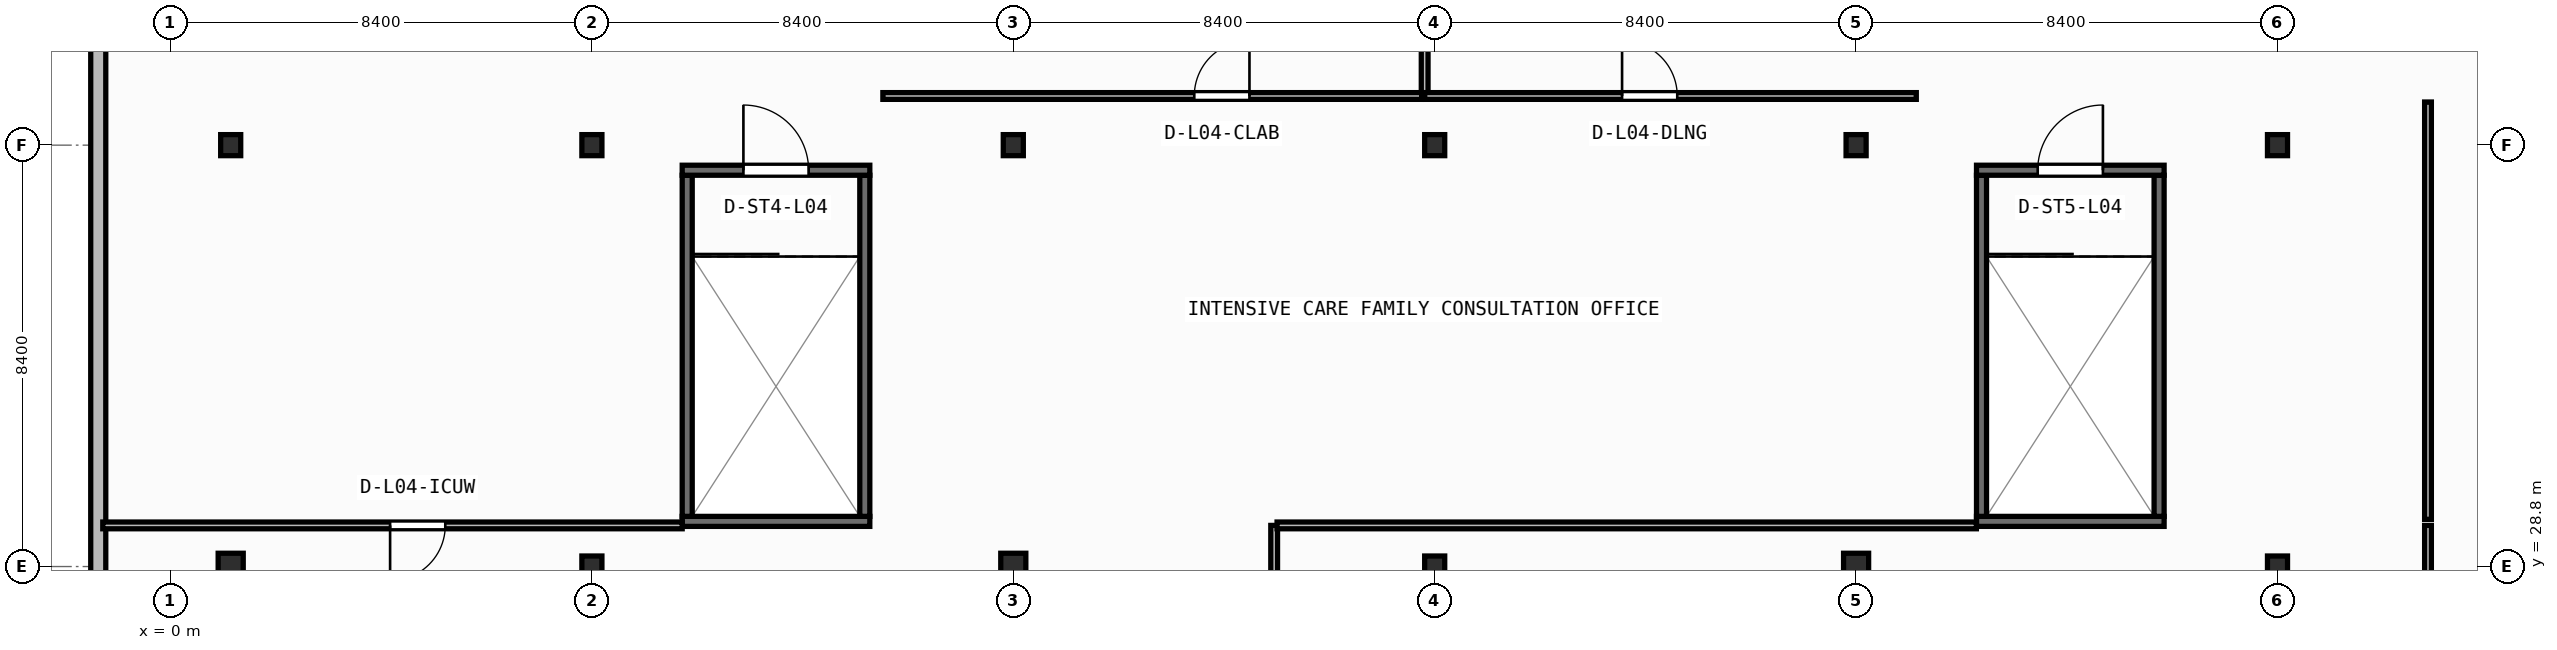
"""IFC4 building model, lengths in metres.
Left out: names, types, materials, properties, quantities, classifications, styles, units other than length and angle.
Written with IfcOpenShell. Run it as: python <this file> out.ifc"""

import sys

from ifc_helpers import new_model, si_unit, direction, frame, frame_2d, origin, origin_2d, place, context, subcontext, project, spatial, rectangle, i_section, extrude, element, fill, save


model = new_model("IFC4")
c1 = context("Model", 3, precision=1e-05, world=origin(), true_north=direction((0.0, 1.0)))
c2 = subcontext(c1, "Body", "Model", "MODEL_VIEW")
j1 = project(units=[si_unit("LENGTHUNIT", "METRE"), si_unit("PLANEANGLEUNIT", "RADIAN")], contexts=[c1])
p1 = place(None, origin())
s1 = spatial("IfcSite", under=j1, at=p1, CompositionType="ELEMENT")
p2 = place(p1, origin())
s2 = spatial("IfcBuilding", under=s1, at=p2, CompositionType="ELEMENT")
p3 = place(p2, frame((0.0, 0.0, 18.0)))
s3 = spatial("IfcBuildingStorey", under=s2, at=p3, CompositionType="ELEMENT", Elevation=18.0)
p4 = place(p3, frame((1.2, 28.8, 0.0), z_axis=(0.0, 0.0, 1.0), x_axis=(1.0, 0.0, 0.0)))
e1 = element("IfcColumn", 1, at=p4, inside=s3, PredefinedType="COLUMN", context=c2, shape_type="SweptSolid", body=[
    extrude(i_section(OverallWidth=0.5, OverallDepth=0.53, WebThickness=0.028, FlangeThickness=0.045, at=origin_2d()), origin(), (0.0, 0.0, 1.0), 4.5),
])
p5 = place(p3, frame((8.4, 28.8, 0.0), z_axis=(0.0, 0.0, 1.0), x_axis=(1.0, 0.0, 0.0)))
e2 = element("IfcColumn", 2, at=p5, inside=s3, PredefinedType="COLUMN", context=c2, shape_type="SweptSolid", body=[
    extrude(i_section(OverallWidth=0.4, OverallDepth=0.42, WebThickness=0.025, FlangeThickness=0.04, at=origin_2d()), origin(), (0.0, 0.0, 1.0), 4.5),
])
p6 = place(p3, frame((16.8, 28.8, 0.0), z_axis=(0.0, 0.0, 1.0), x_axis=(1.0, 0.0, 0.0)))
e3 = element("IfcColumn", 3, at=p6, inside=s3, PredefinedType="COLUMN", context=c2, shape_type="SweptSolid", body=[
    extrude(i_section(OverallWidth=0.5, OverallDepth=0.53, WebThickness=0.028, FlangeThickness=0.045, at=origin_2d()), origin(), (0.0, 0.0, 1.0), 4.5),
])
p7 = place(p3, frame((25.2, 28.8, 0.0), z_axis=(0.0, 0.0, 1.0), x_axis=(1.0, 0.0, 0.0)))
e4 = element("IfcColumn", 4, at=p7, inside=s3, PredefinedType="COLUMN", context=c2, shape_type="SweptSolid", body=[
    extrude(i_section(OverallWidth=0.4, OverallDepth=0.42, WebThickness=0.025, FlangeThickness=0.04, at=origin_2d()), origin(), (0.0, 0.0, 1.0), 4.5),
])
p8 = place(p3, frame((33.6, 28.8, 0.0), z_axis=(0.0, 0.0, 1.0), x_axis=(1.0, 0.0, 0.0)))
e5 = element("IfcColumn", 5, at=p8, inside=s3, PredefinedType="COLUMN", context=c2, shape_type="SweptSolid", body=[
    extrude(i_section(OverallWidth=0.5, OverallDepth=0.53, WebThickness=0.028, FlangeThickness=0.045, at=origin_2d()), origin(), (0.0, 0.0, 1.0), 4.5),
])
for number, where, z_axis, x_axis in (
    (6, (42.0, 28.8, 0.0), (0.0, 0.0, 1.0), (1.0, 0.0, 0.0)),
    (7, (1.2, 37.2, 0.0), (0.0, 0.0, 1.0), (1.0, 0.0, 0.0)),
    (8, (8.4, 37.2, 0.0), (0.0, 0.0, 1.0), (1.0, 0.0, 0.0)),
    (9, (16.8, 37.2, 0.0), (0.0, 0.0, 1.0), (1.0, 0.0, 0.0)),
    (10, (25.2, 37.2, 0.0), (0.0, 0.0, 1.0), (1.0, 0.0, 0.0)),
    (11, (33.6, 37.2, 0.0), (0.0, 0.0, 1.0), (1.0, 0.0, 0.0)),
    (12, (42.0, 37.2, 0.0), (0.0, 0.0, 1.0), (1.0, 0.0, 0.0)),
):
    element("IfcColumn", number, at=place(p3, frame(where, z_axis=z_axis, x_axis=x_axis)), inside=s3, PredefinedType="COLUMN", context=c2, shape_type="SweptSolid", body=[
        extrude(i_section(OverallWidth=0.4, OverallDepth=0.42, WebThickness=0.025, FlangeThickness=0.04, at=origin_2d()), origin(), (0.0, 0.0, 1.0), 4.5),
    ])
p9 = place(p3, frame((-1.44, 45.24, 0.0), z_axis=(0.0, 0.0, 1.0), x_axis=(0.0, -1.0, 0.0)))
e13 = element("IfcWall", 13, at=p9, inside=s3, PredefinedType="STANDARD", context=c2, shape_type="SweptSolid", body=[
    extrude(rectangle(XDim=44.48, YDim=0.3, at=frame_2d((22.24, 0.0))), origin(), (0.0, 0.0, 1.0), 4.08),
])
p10 = place(p9, frame((20.84, 0.0, 0.85)))
e14 = element("IfcOpeningElement", 14, at=p10, cuts=e13, PredefinedType="OPENING", context=c2, shape_type="SweptSolid", body=[
    extrude(rectangle(XDim=2.8, YDim=2.1, at=frame_2d((1.4, 1.05))), frame((0.0, 0.16, 0.0), z_axis=(0.0, -1.0, 0.0), x_axis=(1.0, 0.0, 0.0)), (0.0, 0.0, 1.0), 0.32),
])
p11 = place(p3, frame((10.2, 29.7, 0.0), z_axis=(0.0, 0.0, 1.0), x_axis=(1.0, 0.0, 0.0)))
e15 = element("IfcWall", 15, at=p11, inside=s3, PredefinedType="SHEAR", context=c2, shape_type="SweptSolid", body=[
    extrude(rectangle(XDim=3.74, YDim=0.2, at=frame_2d((1.87, 0.0))), origin(), (0.0, 0.0, 1.0), 4.08),
])
for number, where, z_axis, x_axis in (
    (16, (10.3, 29.8, 0.0), (0.0, 0.0, 1.0), (0.0, 1.0, 0.0)),
    (17, (13.84, 29.8, 0.0), (0.0, 0.0, 1.0), (0.0, 1.0, 0.0)),
):
    element("IfcWall", number, at=place(p3, frame(where, z_axis=z_axis, x_axis=x_axis)), inside=s3, PredefinedType="SHEAR", context=c2, shape_type="SweptSolid", body=[
        extrude(rectangle(XDim=6.8, YDim=0.2, at=frame_2d((3.4, 0.0))), origin(), (0.0, 0.0, 1.0), 4.08),
    ])
p12 = place(p3, frame((10.2, 36.7, 0.0), z_axis=(0.0, 0.0, 1.0), x_axis=(1.0, 0.0, 0.0)))
e18 = element("IfcWall", 18, at=p12, inside=s3, PredefinedType="SHEAR", context=c2, shape_type="SweptSolid", body=[
    extrude(rectangle(XDim=3.74, YDim=0.2, at=frame_2d((1.87, 0.0))), origin(), (0.0, 0.0, 1.0), 4.08),
])
p13 = place(p12, frame((1.22, 0.0, 0.0)))
e19 = element("IfcOpeningElement", 19, at=p13, cuts=e18, PredefinedType="OPENING", context=c2, shape_type="SweptSolid", body=[
    extrude(rectangle(XDim=1.3, YDim=2.15, at=frame_2d((0.65, 1.075))), frame((0.0, 0.11, 0.0), z_axis=(0.0, -1.0, 0.0), x_axis=(1.0, 0.0, 0.0)), (0.0, 0.0, 1.0), 0.22),
])
p14 = place(p3, frame((36.0, 29.7, 0.0), z_axis=(0.0, 0.0, 1.0), x_axis=(1.0, 0.0, 0.0)))
e20 = element("IfcWall", 20, at=p14, inside=s3, PredefinedType="SHEAR", context=c2, shape_type="SweptSolid", body=[
    extrude(rectangle(XDim=3.74, YDim=0.2, at=frame_2d((1.87, 0.0))), origin(), (0.0, 0.0, 1.0), 4.08),
])
for number, where, z_axis, x_axis in (
    (21, (36.1, 29.8, 0.0), (0.0, 0.0, 1.0), (0.0, 1.0, 0.0)),
    (22, (39.64, 29.8, 0.0), (0.0, 0.0, 1.0), (0.0, 1.0, 0.0)),
):
    element("IfcWall", number, at=place(p3, frame(where, z_axis=z_axis, x_axis=x_axis)), inside=s3, PredefinedType="SHEAR", context=c2, shape_type="SweptSolid", body=[
        extrude(rectangle(XDim=6.8, YDim=0.2, at=frame_2d((3.4, 0.0))), origin(), (0.0, 0.0, 1.0), 4.08),
    ])
p15 = place(p3, frame((36.0, 36.7, 0.0), z_axis=(0.0, 0.0, 1.0), x_axis=(1.0, 0.0, 0.0)))
e23 = element("IfcWall", 23, at=p15, inside=s3, PredefinedType="SHEAR", context=c2, shape_type="SweptSolid", body=[
    extrude(rectangle(XDim=3.74, YDim=0.2, at=frame_2d((1.87, 0.0))), origin(), (0.0, 0.0, 1.0), 4.08),
])
p16 = place(p15, frame((1.22, 0.0, 0.0)))
e24 = element("IfcOpeningElement", 24, at=p16, cuts=e23, PredefinedType="OPENING", context=c2, shape_type="SweptSolid", body=[
    extrude(rectangle(XDim=1.3, YDim=2.15, at=frame_2d((0.65, 1.075))), frame((0.0, 0.11, 0.0), z_axis=(0.0, -1.0, 0.0), x_axis=(1.0, 0.0, 0.0)), (0.0, 0.0, 1.0), 0.22),
])
p17 = place(p3, frame((22.0, 14.865, 0.0), z_axis=(0.0, 0.0, 1.0), x_axis=(0.0, 1.0, 0.0)))
e25 = element("IfcWall", 25, at=p17, inside=s3, PredefinedType="PARTITIONING", context=c2, shape_type="SweptSolid", body=[
    extrude(rectangle(XDim=14.755, YDim=0.135, at=frame_2d((7.377, 0.0))), origin(), (0.0, 0.0, 1.0), 4.08),
])
p18 = place(p3, frame((10.2, 29.62, 0.0), z_axis=(0.0, 0.0, 1.0), x_axis=(-1.0, 0.0, 0.0)))
e26 = element("IfcWall", 26, at=p18, inside=s3, PredefinedType="PARTITIONING", context=c2, shape_type="SweptSolid", body=[
    extrude(rectangle(XDim=11.55, YDim=0.135, at=frame_2d((5.775, 0.0))), origin(), (0.0, 0.0, 1.0), 4.08),
])
p19 = place(p18, frame((4.722, 0.0, 0.0)))
e27 = element("IfcOpeningElement", 27, at=p19, cuts=e26, PredefinedType="OPENING", context=c2, shape_type="SweptSolid", body=[
    extrude(rectangle(XDim=1.1, YDim=2.1, at=frame_2d((0.55, 1.05))), frame((0.0, 0.077, 0.0), z_axis=(0.0, -1.0, 0.0), x_axis=(1.0, 0.0, 0.0)), (0.0, 0.0, 1.0), 0.155),
])
p20 = place(p3, frame((35.998, 29.62, 0.0), z_axis=(0.0, 0.0, 1.0), x_axis=(-1.0, 0.0, 0.0)))
e28 = element("IfcWall", 28, at=p20, inside=s3, PredefinedType="PARTITIONING", context=c2, shape_type="SweptSolid", body=[
    extrude(rectangle(XDim=13.94, YDim=0.135, at=frame_2d((6.97, 0.0))), origin(), (0.0, 0.0, 1.0), 4.08),
])
p21 = place(p3, frame((45.0, 14.865, 0.0), z_axis=(0.0, 0.0, 1.0), x_axis=(0.0, 1.0, 0.0)))
e29 = element("IfcWall", 29, at=p21, inside=s3, PredefinedType="PARTITIONING", context=c2, shape_type="SweptSolid", body=[
    extrude(rectangle(XDim=14.755, YDim=0.135, at=frame_2d((7.377, 0.0))), origin(), (0.0, 0.0, 1.0), 4.08),
])
p22 = place(p3, frame((25.0, 42.64, 0.0), z_axis=(0.0, 0.0, 1.0), x_axis=(0.0, -1.0, 0.0)))
e30 = element("IfcWall", 30, at=p22, inside=s3, PredefinedType="PARTITIONING", context=c2, shape_type="SweptSolid", body=[
    extrude(rectangle(XDim=4.46, YDim=0.135, at=frame_2d((2.23, 0.0))), origin(), (0.0, 0.0, 1.0), 4.08),
])
p23 = place(p3, frame((25.0, 38.18, 0.0), z_axis=(0.0, 0.0, 1.0), x_axis=(1.0, 0.0, 0.0)))
e31 = element("IfcWall", 31, at=p23, inside=s3, PredefinedType="PARTITIONING", context=c2, shape_type="SweptSolid", body=[
    extrude(rectangle(XDim=9.8, YDim=0.135, at=frame_2d((4.9, 0.0))), origin(), (0.0, 0.0, 1.0), 4.08),
])
p24 = place(p23, frame((3.935, 0.0, 0.0)))
e32 = element("IfcOpeningElement", 32, at=p24, cuts=e31, PredefinedType="OPENING", context=c2, shape_type="SweptSolid", body=[
    extrude(rectangle(XDim=1.1, YDim=2.1, at=frame_2d((0.55, 1.05))), frame((0.0, 0.077, 0.0), z_axis=(0.0, -1.0, 0.0), x_axis=(1.0, 0.0, 0.0)), (0.0, 0.0, 1.0), 0.155),
])
p25 = place(p3, frame((14.2, 38.18, 0.0), z_axis=(0.0, 0.0, 1.0), x_axis=(1.0, 0.0, 0.0)))
e33 = element("IfcWall", 33, at=p25, inside=s3, PredefinedType="PARTITIONING", context=c2, shape_type="SweptSolid", body=[
    extrude(rectangle(XDim=10.742, YDim=0.135, at=frame_2d((5.371, 0.0))), origin(), (0.0, 0.0, 1.0), 4.08),
])
p26 = place(p25, frame((6.208, 0.0, 0.0)))
e34 = element("IfcOpeningElement", 34, at=p26, cuts=e33, PredefinedType="OPENING", context=c2, shape_type="SweptSolid", body=[
    extrude(rectangle(XDim=1.1, YDim=2.1, at=frame_2d((0.55, 1.05))), frame((0.0, 0.077, 0.0), z_axis=(0.0, -1.0, 0.0), x_axis=(1.0, 0.0, 0.0)), (0.0, 0.0, 1.0), 0.155),
])
p27 = place(p3, frame((45.0, 29.74, 0.0), z_axis=(0.0, 0.0, 1.0), x_axis=(0.0, 1.0, 0.0)))
e35 = element("IfcWall", 35, at=p27, inside=s3, PredefinedType="PARTITIONING", context=c2, shape_type="SweptSolid", body=[
    extrude(rectangle(XDim=8.32, YDim=0.135, at=frame_2d((4.16, 0.0))), origin(), (0.0, 0.0, 1.0), 4.08),
])
p28 = place(p13, origin())
e36 = element("IfcDoor", 36, at=p28, inside=s3, OperationType="SINGLE_SWING_LEFT", PredefinedType="DOOR", context=c2, shape_type="SweptSolid", body=[
    extrude(rectangle(XDim=1.3, YDim=2.15, at=frame_2d((0.65, 1.075))), frame((0.0, 0.025, 0.0), z_axis=(0.0, -1.0, 0.0), x_axis=(1.0, 0.0, 0.0)), (0.0, 0.0, 1.0), 0.05),
])
fill(e19, e36)
p29 = place(p16, origin())
e37 = element("IfcDoor", 37, at=p29, inside=s3, OperationType="SINGLE_SWING_RIGHT", PredefinedType="DOOR", context=c2, shape_type="SweptSolid", body=[
    extrude(rectangle(XDim=1.3, YDim=2.15, at=frame_2d((0.65, 1.075))), frame((0.0, 0.025, 0.0), z_axis=(0.0, -1.0, 0.0), x_axis=(1.0, 0.0, 0.0)), (0.0, 0.0, 1.0), 0.05),
])
fill(e24, e37)
p30 = place(p19, origin())
e38 = element("IfcDoor", 38, at=p30, inside=s3, OperationType="SINGLE_SWING_RIGHT", PredefinedType="DOOR", context=c2, shape_type="SweptSolid", body=[
    extrude(rectangle(XDim=1.1, YDim=2.1, at=frame_2d((0.55, 1.05))), frame((0.0, 0.025, 0.0), z_axis=(0.0, -1.0, 0.0), x_axis=(1.0, 0.0, 0.0)), (0.0, 0.0, 1.0), 0.05),
])
fill(e27, e38)
p31 = place(p24, origin())
e39 = element("IfcDoor", 39, at=p31, inside=s3, OperationType="SINGLE_SWING_LEFT", PredefinedType="DOOR", context=c2, shape_type="SweptSolid", body=[
    extrude(rectangle(XDim=1.1, YDim=2.1, at=frame_2d((0.55, 1.05))), frame((0.0, 0.025, 0.0), z_axis=(0.0, -1.0, 0.0), x_axis=(1.0, 0.0, 0.0)), (0.0, 0.0, 1.0), 0.05),
])
fill(e32, e39)
p32 = place(p26, origin())
e40 = element("IfcDoor", 40, at=p32, inside=s3, OperationType="SINGLE_SWING_RIGHT", PredefinedType="DOOR", context=c2, shape_type="SweptSolid", body=[
    extrude(rectangle(XDim=1.1, YDim=2.1, at=frame_2d((0.55, 1.05))), frame((0.0, 0.025, 0.0), z_axis=(0.0, -1.0, 0.0), x_axis=(1.0, 0.0, 0.0)), (0.0, 0.0, 1.0), 0.05),
])
fill(e34, e40)
save(model, sys.argv[1])
